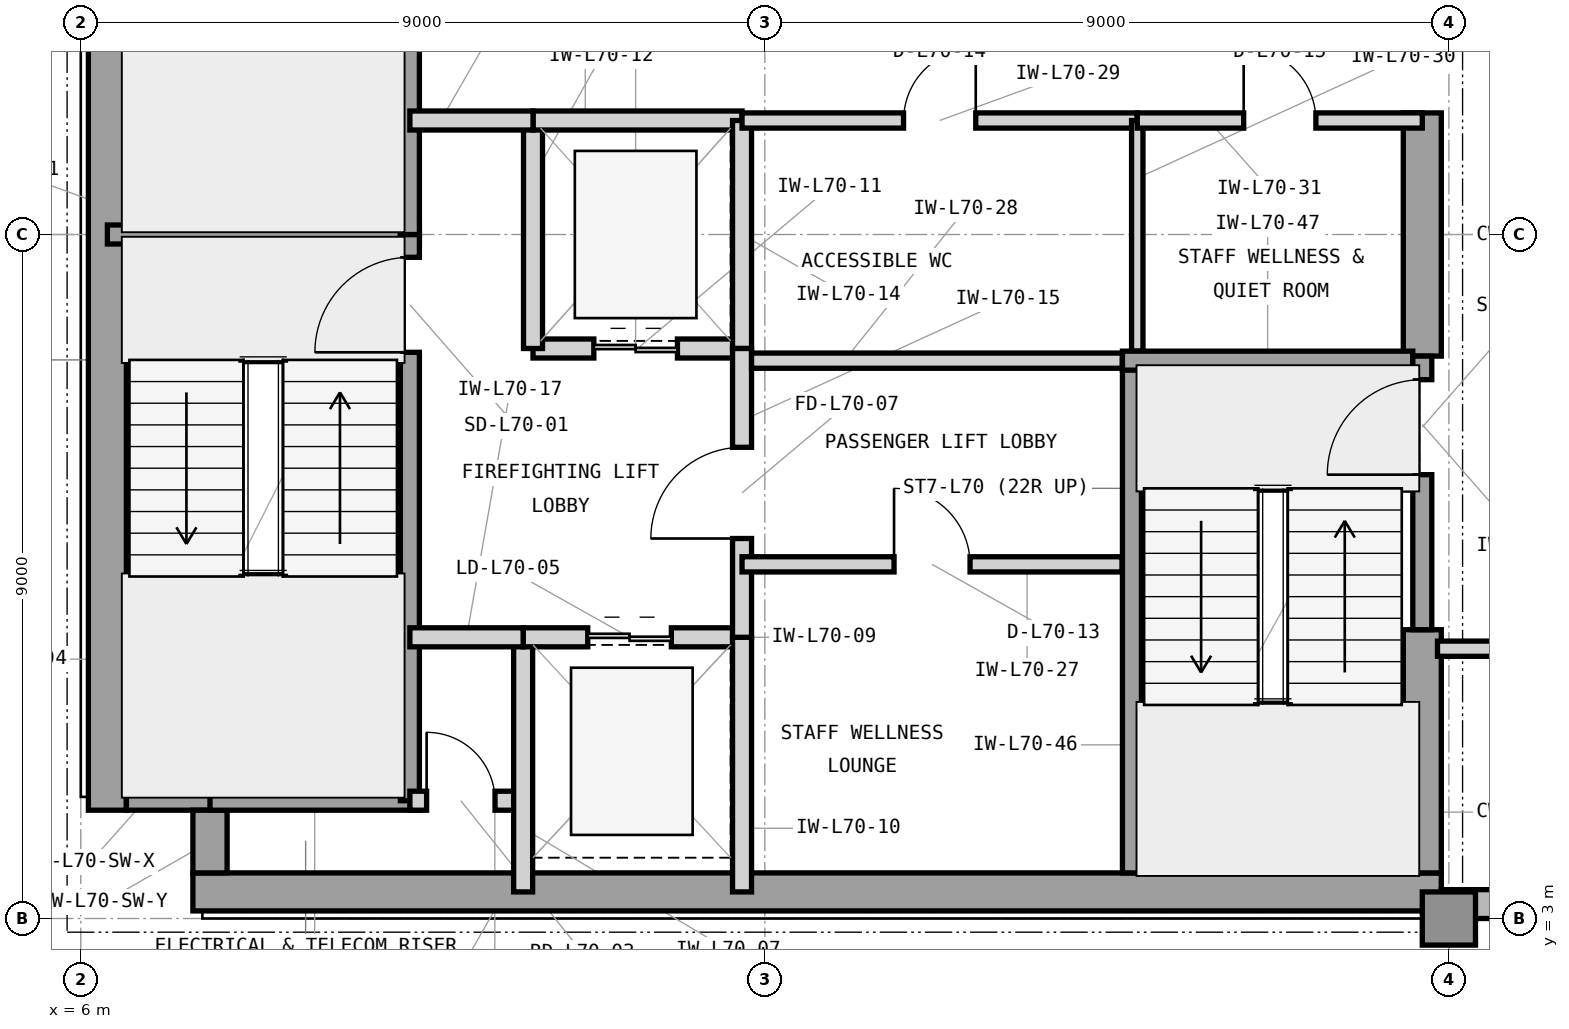
"""IFC4 building model, lengths in metres.
Left out: names, types, materials, properties, quantities, classifications, styles, units other than length and angle.
Written with IfcOpenShell. Run it as: python <this file> out.ifc"""

import sys

from ifc_helpers import new_model, si_unit, direction, frame, frame_2d, origin, origin_2d, place, context, subcontext, project, spatial, rectangle, extrude, element, fill, save


model = new_model("IFC4")
c1 = context("Model", 3, precision=1e-05, world=origin(), true_north=direction((0.0, 1.0)))
c2 = subcontext(c1, "Body", "Model", "MODEL_VIEW")
j1 = project(units=[si_unit("LENGTHUNIT", "METRE"), si_unit("PLANEANGLEUNIT", "RADIAN")], contexts=[c1])
p1 = place(None, origin())
s1 = spatial("IfcSite", under=j1, at=p1, CompositionType="ELEMENT")
p2 = place(p1, origin())
s2 = spatial("IfcBuilding", under=s1, at=p2, CompositionType="ELEMENT")
p3 = place(p2, frame((0.0, 0.0, 285.9)))
s3 = spatial("IfcBuildingStorey", under=s2, at=p3, CompositionType="ELEMENT", Elevation=285.9)
p4 = place(p3, frame((7.475, 3.35, 0.0), z_axis=(0.0, 0.0, 1.0), x_axis=(1.0, 0.0, 0.0)))
e1 = element("IfcWall", 1, at=p4, inside=s3, PredefinedType="SHEAR", context=c2, shape_type="SweptSolid", body=[
    extrude(rectangle(XDim=16.425, YDim=0.5, at=frame_2d((8.212, 0.0))), origin(), (0.0, 0.0, 1.0), 3.9),
])
p5 = place(p3, frame((6.35, 4.425, 0.0), z_axis=(0.0, 0.0, 1.0), x_axis=(0.0, 1.0, 0.0)))
e2 = element("IfcWall", 2, at=p5, inside=s3, PredefinedType="SHEAR", context=c2, shape_type="SweptSolid", body=[
    extrude(rectangle(XDim=15.15, YDim=0.5, at=frame_2d((7.575, 0.0))), origin(), (0.0, 0.0, 1.0), 3.9),
])
p6 = place(p3, frame((23.65, 3.6, 0.0), z_axis=(0.0, 0.0, 1.0), x_axis=(0.0, 1.0, 0.0)))
e3 = element("IfcWall", 3, at=p6, inside=s3, PredefinedType="SHEAR", context=c2, shape_type="SweptSolid", body=[
    extrude(rectangle(XDim=3.2, YDim=0.5, at=frame_2d((1.6, 0.0))), origin(), (0.0, 0.0, 1.0), 3.9),
])
p7 = place(p3, frame((23.65, 10.4, 0.0), z_axis=(0.0, 0.0, 1.0), x_axis=(0.0, 1.0, 0.0)))
e4 = element("IfcWall", 4, at=p7, inside=s3, PredefinedType="SHEAR", context=c2, shape_type="SweptSolid", body=[
    extrude(rectangle(XDim=3.2, YDim=0.5, at=frame_2d((1.6, 0.0))), origin(), (0.0, 0.0, 1.0), 3.9),
])
p8 = place(p3, frame((6.6, 4.65, 0.0), z_axis=(0.0, 0.0, 1.0), x_axis=(1.0, 0.0, 0.0)))
e5 = element("IfcWall", 5, at=p8, inside=s3, PredefinedType="SHEAR", context=c2, shape_type="SweptSolid", body=[
    extrude(rectangle(XDim=1.325, YDim=0.45, at=frame_2d((0.663, 0.0))), origin(), (0.0, 0.0, 1.0), 3.9),
])
p9 = place(p3, frame((7.7, 3.6, 0.0), z_axis=(0.0, 0.0, 1.0), x_axis=(0.0, 1.0, 0.0)))
e6 = element("IfcWall", 6, at=p9, inside=s3, PredefinedType="SHEAR", context=c2, shape_type="SweptSolid", body=[
    extrude(rectangle(XDim=0.825, YDim=0.45, at=frame_2d((0.413, 0.0))), origin(), (0.0, 0.0, 1.0), 3.9),
])
p10 = place(p3, frame((24.0, 3.0, 0.0), z_axis=(0.0, 0.0, 1.0), x_axis=(1.0, 0.0, 0.0)))
e7 = element("IfcColumn", 7, at=p10, inside=s3, PredefinedType="COLUMN", context=c2, shape_type="SweptSolid", body=[
    extrude(rectangle(XDim=0.7, YDim=0.7, at=origin_2d()), origin(), (0.0, 0.0, 1.0), 3.9),
])
p11 = place(p3, frame((23.9, 3.19, 0.0), z_axis=(0.0, 0.0, 1.0), x_axis=(1.0, 0.0, 0.0)))
e8 = element("IfcWall", 8, at=p11, inside=s3, PredefinedType="STANDARD", context=c2, shape_type="SweptSolid", body=[
    extrude(rectangle(XDim=25.5, YDim=0.38, at=frame_2d((12.75, 0.0))), origin(), (0.0, 0.0, 1.0), 3.715),
])
p12 = place(p11, frame((1.6, 0.0, 0.8)))
e9 = element("IfcOpeningElement", 9, at=p12, cuts=e8, PredefinedType="OPENING", context=c2, shape_type="SweptSolid", body=[
    extrude(rectangle(XDim=1.9, YDim=2.35, at=frame_2d((0.95, 1.175))), frame((0.0, 0.2, 0.0), z_axis=(0.0, -1.0, 0.0), x_axis=(1.0, 0.0, 0.0)), (0.0, 0.0, 1.0), 0.4),
])
p13 = place(p11, frame((11.45, 0.0, 0.8)))
e10 = element("IfcOpeningElement", 10, at=p13, cuts=e8, PredefinedType="OPENING", context=c2, shape_type="SweptSolid", body=[
    extrude(rectangle(XDim=2.6, YDim=2.35, at=frame_2d((1.3, 1.175))), frame((0.0, 0.2, 0.0), z_axis=(0.0, -1.0, 0.0), x_axis=(1.0, 0.0, 0.0)), (0.0, 0.0, 1.0), 0.4),
])
p14 = place(p11, frame((15.904, 0.0, 0.8)))
e11 = element("IfcOpeningElement", 11, at=p14, cuts=e8, PredefinedType="OPENING", context=c2, shape_type="SweptSolid", body=[
    extrude(rectangle(XDim=1.2, YDim=2.35, at=frame_2d((0.6, 1.175))), frame((0.0, 0.2, 0.0), z_axis=(0.0, -1.0, 0.0), x_axis=(1.0, 0.0, 0.0)), (0.0, 0.0, 1.0), 0.4),
])
p15 = place(p3, frame((6.35, 12.0, 0.0), z_axis=(0.0, 0.0, 1.0), x_axis=(1.0, 0.0, 0.0)))
e12 = element("IfcWall", 12, at=p15, inside=s3, PredefinedType="SHEAR", context=c2, shape_type="SweptSolid", body=[
    extrude(rectangle(XDim=4.105, YDim=0.25, at=frame_2d((2.052, 0.0))), origin(), (0.0, 0.0, 1.0), 3.9),
])
p16 = place(p3, frame((7.7, 4.55, 0.0), z_axis=(0.0, 0.0, 1.0), x_axis=(1.0, 0.0, 0.0)))
e13 = element("IfcWall", 13, at=p16, inside=s3, PredefinedType="SHEAR", context=c2, shape_type="SweptSolid", body=[
    extrude(rectangle(XDim=2.755, YDim=0.25, at=frame_2d((1.377, 0.0))), origin(), (0.0, 0.0, 1.0), 3.9),
])
p17 = place(p3, frame((10.33, 4.55, 0.0), z_axis=(0.0, 0.0, 1.0), x_axis=(0.0, 1.0, 0.0)))
e14 = element("IfcWall", 14, at=p17, inside=s3, PredefinedType="SHEAR", context=c2, shape_type="SweptSolid", body=[
    extrude(rectangle(XDim=7.45, YDim=0.25, at=frame_2d((3.725, 0.0))), origin(), (0.0, 0.0, 1.0), 3.9),
])
p18 = place(p17, frame((5.9, 0.0, 0.0)))
e15 = element("IfcOpeningElement", 15, at=p18, cuts=e14, PredefinedType="OPENING", context=c2, shape_type="SweptSolid", body=[
    extrude(rectangle(XDim=1.25, YDim=2.2, at=frame_2d((0.625, 1.1))), frame((0.0, 0.135, 0.0), z_axis=(0.0, -1.0, 0.0), x_axis=(1.0, 0.0, 0.0)), (0.0, 0.0, 1.0), 0.27),
])
p19 = place(p3, frame((10.33, 12.0, 0.0), z_axis=(0.0, 0.0, 1.0), x_axis=(0.0, 1.0, 0.0)))
e16 = element("IfcWall", 16, at=p19, inside=s3, PredefinedType="SHEAR", context=c2, shape_type="SweptSolid", body=[
    extrude(rectangle(XDim=7.45, YDim=0.25, at=frame_2d((3.725, 0.0))), origin(), (0.0, 0.0, 1.0), 3.9),
])
p20 = place(p19, frame((5.85, 0.0, 0.0)))
e17 = element("IfcOpeningElement", 17, at=p20, cuts=e16, PredefinedType="OPENING", context=c2, shape_type="SweptSolid", body=[
    extrude(rectangle(XDim=1.25, YDim=2.2, at=frame_2d((0.625, 1.1))), frame((0.0, 0.135, 0.0), z_axis=(0.0, -1.0, 0.0), x_axis=(1.0, 0.0, 0.0)), (0.0, 0.0, 1.0), 0.27),
])
p21 = place(p3, frame((10.33, 4.55, 0.0), z_axis=(0.0, 0.0, 1.0), x_axis=(1.0, 0.0, 0.0)))
e18 = element("IfcWall", 18, at=p21, inside=s3, PredefinedType="PARTITIONING", context=c2, shape_type="SweptSolid", body=[
    extrude(rectangle(XDim=1.49, YDim=0.25, at=frame_2d((0.745, 0.0))), origin(), (0.0, 0.0, 1.0), 3.705),
])
p22 = place(p21, frame((0.22, 0.0, 0.0)))
e19 = element("IfcOpeningElement", 19, at=p22, cuts=e18, PredefinedType="OPENING", context=c2, shape_type="SweptSolid", body=[
    extrude(rectangle(XDim=0.9, YDim=2.1, at=frame_2d((0.45, 1.05))), frame((0.0, 0.135, 0.0), z_axis=(0.0, -1.0, 0.0), x_axis=(1.0, 0.0, 0.0)), (0.0, 0.0, 1.0), 0.27),
])
p23 = place(p3, frame((11.82, 3.35, 0.0), z_axis=(0.0, 0.0, 1.0), x_axis=(0.0, 1.0, 0.0)))
e20 = element("IfcWall", 20, at=p23, inside=s3, PredefinedType="PARTITIONING", context=c2, shape_type="SweptSolid", body=[
    extrude(rectangle(XDim=3.35, YDim=0.25, at=frame_2d((1.675, 0.0))), origin(), (0.0, 0.0, 1.0), 3.705),
])
p24 = place(p3, frame((11.82, 6.7, 0.0), z_axis=(0.0, 0.0, 1.0), x_axis=(1.0, 0.0, 0.0)))
e21 = element("IfcWall", 21, at=p24, inside=s3, PredefinedType="PARTITIONING", context=c2, shape_type="SweptSolid", body=[
    extrude(rectangle(XDim=2.88, YDim=0.25, at=frame_2d((1.44, 0.0))), origin(), (0.0, 0.0, 1.0), 3.354),
])
p25 = place(p24, frame((0.85, 0.0, 0.0)))
e22 = element("IfcOpeningElement", 22, at=p25, cuts=e21, PredefinedType="OPENING", context=c2, shape_type="SweptSolid", body=[
    extrude(rectangle(XDim=1.1, YDim=2.25, at=frame_2d((0.55, 1.125))), frame((0.0, 0.135, 0.0), z_axis=(0.0, -1.0, 0.0), x_axis=(1.0, 0.0, 0.0)), (0.0, 0.0, 1.0), 0.27),
])
p26 = place(p3, frame((14.7, 3.35, 0.0), z_axis=(0.0, 0.0, 1.0), x_axis=(0.0, 1.0, 0.0)))
e23 = element("IfcWall", 23, at=p26, inside=s3, PredefinedType="PARTITIONING", context=c2, shape_type="SweptSolid", body=[
    extrude(rectangle(XDim=3.35, YDim=0.25, at=frame_2d((1.675, 0.0))), origin(), (0.0, 0.0, 1.0), 3.705),
])
p27 = place(p3, frame((11.95, 10.5, 0.0), z_axis=(0.0, 0.0, 1.0), x_axis=(1.0, 0.0, 0.0)))
e24 = element("IfcWall", 24, at=p27, inside=s3, PredefinedType="PARTITIONING", context=c2, shape_type="SweptSolid", body=[
    extrude(rectangle(XDim=2.75, YDim=0.25, at=frame_2d((1.375, 0.0))), origin(), (0.0, 0.0, 1.0), 3.354),
])
p28 = place(p27, frame((0.8, 0.0, 0.0)))
e25 = element("IfcOpeningElement", 25, at=p28, cuts=e24, PredefinedType="OPENING", context=c2, shape_type="SweptSolid", body=[
    extrude(rectangle(XDim=1.1, YDim=2.25, at=frame_2d((0.55, 1.125))), frame((0.0, 0.135, 0.0), z_axis=(0.0, -1.0, 0.0), x_axis=(1.0, 0.0, 0.0)), (0.0, 0.0, 1.0), 0.27),
])
p29 = place(p3, frame((11.95, 10.5, 0.0), z_axis=(0.0, 0.0, 1.0), x_axis=(0.0, 1.0, 0.0)))
e26 = element("IfcWall", 26, at=p29, inside=s3, PredefinedType="PARTITIONING", context=c2, shape_type="SweptSolid", body=[
    extrude(rectangle(XDim=3.0, YDim=0.25, at=frame_2d((1.5, 0.0))), origin(), (0.0, 0.0, 1.0), 3.705),
])
p30 = place(p3, frame((11.95, 13.5, 0.0), z_axis=(0.0, 0.0, 1.0), x_axis=(1.0, 0.0, 0.0)))
e27 = element("IfcWall", 27, at=p30, inside=s3, PredefinedType="PARTITIONING", context=c2, shape_type="SweptSolid", body=[
    extrude(rectangle(XDim=2.75, YDim=0.25, at=frame_2d((1.375, 0.0))), origin(), (0.0, 0.0, 1.0), 3.354),
])
p31 = place(p3, frame((14.7, 10.5, 0.0), z_axis=(0.0, 0.0, 1.0), x_axis=(0.0, 1.0, 0.0)))
e28 = element("IfcWall", 28, at=p31, inside=s3, PredefinedType="PARTITIONING", context=c2, shape_type="SweptSolid", body=[
    extrude(rectangle(XDim=3.0, YDim=0.25, at=frame_2d((1.5, 0.0))), origin(), (0.0, 0.0, 1.0), 3.705),
])
p32 = place(p3, frame((14.7, 6.7, 0.0), z_axis=(0.0, 0.0, 1.0), x_axis=(0.0, 1.0, 0.0)))
e29 = element("IfcWall", 29, at=p32, inside=s3, PredefinedType="PARTITIONING", context=c2, shape_type="SweptSolid", body=[
    extrude(rectangle(XDim=3.8, YDim=0.25, at=frame_2d((1.9, 0.0))), origin(), (0.0, 0.0, 1.0), 3.705),
])
p33 = place(p32, frame((1.3, 0.0, 0.0)))
e30 = element("IfcOpeningElement", 30, at=p33, cuts=e29, PredefinedType="OPENING", context=c2, shape_type="SweptSolid", body=[
    extrude(rectangle(XDim=1.2, YDim=2.2, at=frame_2d((0.6, 1.1))), frame((0.0, 0.135, 0.0), z_axis=(0.0, -1.0, 0.0), x_axis=(1.0, 0.0, 0.0)), (0.0, 0.0, 1.0), 0.27),
])
p34 = place(p3, frame((10.33, 13.5, 0.0), z_axis=(0.0, 0.0, 1.0), x_axis=(1.0, 0.0, 0.0)))
e31 = element("IfcWall", 31, at=p34, inside=s3, PredefinedType="PARTITIONING", context=c2, shape_type="SweptSolid", body=[
    extrude(rectangle(XDim=1.62, YDim=0.25, at=frame_2d((0.81, 0.0))), origin(), (0.0, 0.0, 1.0), 3.354),
])
p35 = place(p3, frame((10.33, 6.7, 0.0), z_axis=(0.0, 0.0, 1.0), x_axis=(1.0, 0.0, 0.0)))
e32 = element("IfcWall", 32, at=p35, inside=s3, PredefinedType="PARTITIONING", context=c2, shape_type="SweptSolid", body=[
    extrude(rectangle(XDim=1.49, YDim=0.25, at=frame_2d((0.745, 0.0))), origin(), (0.0, 0.0, 1.0), 3.354),
])
p36 = place(p3, frame((14.7, 7.66, 0.0), z_axis=(0.0, 0.0, 1.0), x_axis=(1.0, 0.0, 0.0)))
e33 = element("IfcWall", 33, at=p36, inside=s3, PredefinedType="PARTITIONING", context=c2, shape_type="SweptSolid", body=[
    extrude(rectangle(XDim=5.0, YDim=0.2, at=frame_2d((2.5, 0.0))), origin(), (0.0, 0.0, 1.0), 3.705),
])
p37 = place(p36, frame((2.0, 0.0, 0.0)))
e34 = element("IfcOpeningElement", 34, at=p37, cuts=e33, PredefinedType="OPENING", context=c2, shape_type="SweptSolid", body=[
    extrude(rectangle(XDim=1.0, YDim=2.15, at=frame_2d((0.5, 1.075))), frame((0.0, 0.11, 0.0), z_axis=(0.0, -1.0, 0.0), x_axis=(1.0, 0.0, 0.0)), (0.0, 0.0, 1.0), 0.22),
])
p38 = place(p3, frame((14.825, 10.34, 0.0), z_axis=(0.0, 0.0, 1.0), x_axis=(1.0, 0.0, 0.0)))
e35 = element("IfcWall", 35, at=p38, inside=s3, PredefinedType="PARTITIONING", context=c2, shape_type="SweptSolid", body=[
    extrude(rectangle(XDim=4.88, YDim=0.2, at=frame_2d((2.44, 0.0))), origin(), (0.0, 0.0, 1.0), 3.705),
])
p39 = place(p3, frame((14.7, 13.5, 0.0), z_axis=(0.0, 0.0, 1.0), x_axis=(1.0, 0.0, 0.0)))
e36 = element("IfcWall", 36, at=p39, inside=s3, PredefinedType="PARTITIONING", context=c2, shape_type="SweptSolid", body=[
    extrude(rectangle(XDim=5.2, YDim=0.2, at=frame_2d((2.6, 0.0))), origin(), (0.0, 0.0, 1.0), 3.354),
])
p40 = place(p39, frame((2.125, 0.0, 0.0)))
e37 = element("IfcOpeningElement", 37, at=p40, cuts=e36, PredefinedType="OPENING", context=c2, shape_type="SweptSolid", body=[
    extrude(rectangle(XDim=0.95, YDim=2.1, at=frame_2d((0.475, 1.05))), frame((0.0, 0.11, 0.0), z_axis=(0.0, -1.0, 0.0), x_axis=(1.0, 0.0, 0.0)), (0.0, 0.0, 1.0), 0.22),
])
p41 = place(p3, frame((19.9, 10.465, 0.0), z_axis=(0.0, 0.0, 1.0), x_axis=(0.0, 1.0, 0.0)))
e38 = element("IfcWall", 38, at=p41, inside=s3, PredefinedType="PARTITIONING", context=c2, shape_type="SweptSolid", body=[
    extrude(rectangle(XDim=3.035, YDim=0.15, at=frame_2d((1.518, 0.0))), origin(), (0.0, 0.0, 1.0), 3.705),
])
p42 = place(p3, frame((19.9, 13.5, 0.0), z_axis=(0.0, 0.0, 1.0), x_axis=(1.0, 0.0, 0.0)))
e39 = element("IfcWall", 39, at=p42, inside=s3, PredefinedType="PARTITIONING", context=c2, shape_type="SweptSolid", body=[
    extrude(rectangle(XDim=3.75, YDim=0.2, at=frame_2d((1.875, 0.0))), origin(), (0.0, 0.0, 1.0), 3.354),
])
p43 = place(p42, frame((1.4, 0.0, 0.0)))
e40 = element("IfcOpeningElement", 40, at=p43, cuts=e39, PredefinedType="OPENING", context=c2, shape_type="SweptSolid", body=[
    extrude(rectangle(XDim=0.95, YDim=2.1, at=frame_2d((0.475, 1.05))), frame((0.0, 0.11, 0.0), z_axis=(0.0, -1.0, 0.0), x_axis=(1.0, 0.0, 0.0)), (0.0, 0.0, 1.0), 0.22),
])
p44 = place(p3, frame((23.85, 6.55, 0.0), z_axis=(0.0, 0.0, 1.0), x_axis=(1.0, 0.0, 0.0)))
e41 = element("IfcWall", 41, at=p44, inside=s3, PredefinedType="PARTITIONING", context=c2, shape_type="SweptSolid", body=[
    extrude(rectangle(XDim=7.35, YDim=0.2, at=frame_2d((3.675, 0.0))), origin(), (0.0, 0.0, 1.0), 3.705),
])
p45 = place(p44, frame((2.8, 0.0, 0.0)))
e42 = element("IfcOpeningElement", 42, at=p45, cuts=e41, PredefinedType="OPENING", context=c2, shape_type="SweptSolid", body=[
    extrude(rectangle(XDim=1.0, YDim=2.15, at=frame_2d((0.5, 1.075))), frame((0.0, 0.11, 0.0), z_axis=(0.0, -1.0, 0.0), x_axis=(1.0, 0.0, 0.0)), (0.0, 0.0, 1.0), 0.22),
])
p46 = place(p3, frame((19.83, 3.6, 0.0), z_axis=(0.0, 0.0, 1.0), x_axis=(0.0, 1.0, 0.0)))
e43 = element("IfcWall", 43, at=p46, inside=s3, PredefinedType="SHEAR", context=c2, shape_type="SweptSolid", body=[
    extrude(rectangle(XDim=6.74, YDim=0.25, at=frame_2d((3.37, 0.0))), origin(), (0.0, 0.0, 1.0), 3.9),
])
p47 = place(p3, frame((19.705, 10.34, 0.0), z_axis=(0.0, 0.0, 1.0), x_axis=(1.0, 0.0, 0.0)))
e44 = element("IfcWall", 44, at=p47, inside=s3, PredefinedType="SHEAR", context=c2, shape_type="SweptSolid", body=[
    extrude(rectangle(XDim=3.82, YDim=0.25, at=frame_2d((1.91, 0.0))), origin(), (0.0, 0.0, 1.0), 3.9),
])
p48 = place(p3, frame((23.65, 6.8, 0.0), z_axis=(0.0, 0.0, 1.0), x_axis=(0.0, 1.0, 0.0)))
e45 = element("IfcWall", 45, at=p48, inside=s3, PredefinedType="SHEAR", context=c2, shape_type="SweptSolid", body=[
    extrude(rectangle(XDim=3.6, YDim=0.25, at=frame_2d((1.8, 0.0))), origin(), (0.0, 0.0, 1.0), 3.9),
])
p49 = place(p48, frame((2.04, 0.0, 0.0)))
e46 = element("IfcOpeningElement", 46, at=p49, cuts=e45, PredefinedType="OPENING", context=c2, shape_type="SweptSolid", body=[
    extrude(rectangle(XDim=1.25, YDim=2.2, at=frame_2d((0.625, 1.1))), frame((0.0, 0.135, 0.0), z_axis=(0.0, -1.0, 0.0), x_axis=(1.0, 0.0, 0.0)), (0.0, 0.0, 1.0), 0.27),
])
p50 = place(p18, origin())
e47 = element("IfcDoor", 47, at=p50, inside=s3, OperationType="SINGLE_SWING_LEFT", PredefinedType="DOOR", context=c2, shape_type="SweptSolid", body=[
    extrude(rectangle(XDim=1.25, YDim=2.2, at=frame_2d((0.625, 1.1))), frame((0.0, 0.025, 0.0), z_axis=(0.0, -1.0, 0.0), x_axis=(1.0, 0.0, 0.0)), (0.0, 0.0, 1.0), 0.05),
])
fill(e15, e47)
p51 = place(p22, origin())
e48 = element("IfcDoor", 48, at=p51, inside=s3, OperationType="SINGLE_SWING_LEFT", PredefinedType="TRAPDOOR", context=c2, shape_type="SweptSolid", body=[
    extrude(rectangle(XDim=0.9, YDim=2.1, at=frame_2d((0.45, 1.05))), frame((0.0, 0.025, 0.0), z_axis=(0.0, -1.0, 0.0), x_axis=(1.0, 0.0, 0.0)), (0.0, 0.0, 1.0), 0.05),
])
fill(e19, e48)
p52 = place(p25, origin())
e49 = element("IfcDoor", 49, at=p52, inside=s3, OperationType="DOUBLE_DOOR_SLIDING", PredefinedType="DOOR", context=c2, shape_type="SweptSolid", body=[
    extrude(rectangle(XDim=1.1, YDim=2.25, at=frame_2d((0.55, 1.125))), frame((0.0, 0.025, 0.0), z_axis=(0.0, -1.0, 0.0), x_axis=(1.0, 0.0, 0.0)), (0.0, 0.0, 1.0), 0.05),
])
fill(e22, e49)
p53 = place(p28, origin())
e50 = element("IfcDoor", 50, at=p53, inside=s3, OperationType="DOUBLE_DOOR_SLIDING", PredefinedType="DOOR", context=c2, shape_type="SweptSolid", body=[
    extrude(rectangle(XDim=1.1, YDim=2.25, at=frame_2d((0.55, 1.125))), frame((0.0, 0.025, 0.0), z_axis=(0.0, -1.0, 0.0), x_axis=(1.0, 0.0, 0.0)), (0.0, 0.0, 1.0), 0.05),
])
fill(e25, e50)
p54 = place(p33, origin())
e51 = element("IfcDoor", 51, at=p54, inside=s3, OperationType="SINGLE_SWING_LEFT", PredefinedType="DOOR", context=c2, shape_type="SweptSolid", body=[
    extrude(rectangle(XDim=1.2, YDim=2.2, at=frame_2d((0.6, 1.1))), frame((0.0, 0.025, 0.0), z_axis=(0.0, -1.0, 0.0), x_axis=(1.0, 0.0, 0.0)), (0.0, 0.0, 1.0), 0.05),
])
fill(e30, e51)
p55 = place(p37, origin())
e52 = element("IfcDoor", 52, at=p55, inside=s3, OperationType="SINGLE_SWING_LEFT", PredefinedType="DOOR", context=c2, shape_type="SweptSolid", body=[
    extrude(rectangle(XDim=1.0, YDim=2.15, at=frame_2d((0.5, 1.075))), frame((0.0, 0.025, 0.0), z_axis=(0.0, -1.0, 0.0), x_axis=(1.0, 0.0, 0.0)), (0.0, 0.0, 1.0), 0.05),
])
fill(e34, e52)
p56 = place(p40, origin())
e53 = element("IfcDoor", 53, at=p56, inside=s3, OperationType="SINGLE_SWING_RIGHT", PredefinedType="DOOR", context=c2, shape_type="SweptSolid", body=[
    extrude(rectangle(XDim=0.95, YDim=2.1, at=frame_2d((0.475, 1.05))), frame((0.0, 0.025, 0.0), z_axis=(0.0, -1.0, 0.0), x_axis=(1.0, 0.0, 0.0)), (0.0, 0.0, 1.0), 0.05),
])
fill(e37, e53)
p57 = place(p43, origin())
e54 = element("IfcDoor", 54, at=p57, inside=s3, OperationType="SINGLE_SWING_LEFT", PredefinedType="DOOR", context=c2, shape_type="SweptSolid", body=[
    extrude(rectangle(XDim=0.95, YDim=2.1, at=frame_2d((0.475, 1.05))), frame((0.0, 0.025, 0.0), z_axis=(0.0, -1.0, 0.0), x_axis=(1.0, 0.0, 0.0)), (0.0, 0.0, 1.0), 0.05),
])
fill(e40, e54)
p58 = place(p49, origin())
e55 = element("IfcDoor", 55, at=p58, inside=s3, OperationType="SINGLE_SWING_LEFT", PredefinedType="DOOR", context=c2, shape_type="SweptSolid", body=[
    extrude(rectangle(XDim=1.25, YDim=2.2, at=frame_2d((0.625, 1.1))), frame((0.0, 0.025, 0.0), z_axis=(0.0, -1.0, 0.0), x_axis=(1.0, 0.0, 0.0)), (0.0, 0.0, 1.0), 0.05),
])
fill(e46, e55)
save(model, sys.argv[1])
